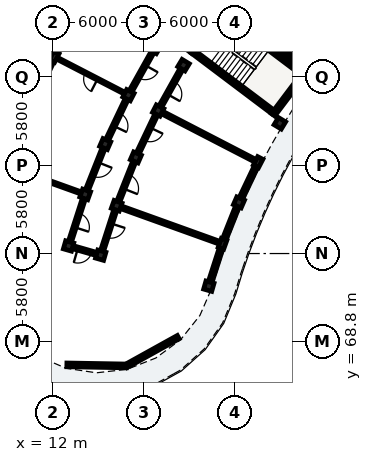
"""IFC4 building model, lengths in metres.
Left out: names, types, materials, properties, quantities, classifications, styles, units other than length and angle.
Written with IfcOpenShell. Run it as: python <this file> out.ifc"""

import sys

from ifc_helpers import new_model, si_unit, direction, frame, frame_2d, origin, origin_2d, place, context, subcontext, project, spatial, rectangle, extrude, element, fill, save


model = new_model("IFC4")
c1 = context("Model", 3, precision=1e-05, world=origin(), true_north=direction((0.0, 1.0)))
c2 = subcontext(c1, "Body", "Model", "MODEL_VIEW")
j1 = project(units=[si_unit("LENGTHUNIT", "METRE"), si_unit("PLANEANGLEUNIT", "RADIAN")], contexts=[c1])
p1 = place(None, origin())
s1 = spatial("IfcSite", under=j1, at=p1, CompositionType="ELEMENT")
p2 = place(p1, origin())
s2 = spatial("IfcBuilding", under=s1, at=p2, CompositionType="ELEMENT")
p3 = place(p2, frame((0.0, 0.0, 15.56)))
s3 = spatial("IfcBuildingStorey", under=s2, at=p3, CompositionType="ELEMENT", Elevation=15.56)
p4 = place(p3, frame((21.199, 87.897, 0.0), z_axis=(0.0, 0.0, 1.0), x_axis=(0.798639633744, -0.601809550782, 0.0)))
e1 = element("IfcWall", 1, at=p4, inside=s3, PredefinedType="SHEAR", context=c2, shape_type="SweptSolid", body=[
    extrude(rectangle(XDim=6.6, YDim=0.28, at=frame_2d((3.3, 0.0))), origin(), (0.0, 0.0, 1.0), 3.11),
])
for number, where, z_axis, x_axis in (
    (2, (26.497, 83.729, 0.0), (0.0, 0.0, 1.0), (0.602, 0.799, 0.0)),
    (3, (21.003, 87.87, 0.0), (0.0, 0.0, 1.0), (0.602, 0.799, 0.0)),
):
    element("IfcWall", number, at=place(p3, frame(where, z_axis=z_axis, x_axis=x_axis)), inside=s3, PredefinedType="SHEAR", context=c2, shape_type="SweptSolid", body=[
        extrude(rectangle(XDim=3.48, YDim=0.28, at=frame_2d((1.74, 0.0))), origin(), (0.0, 0.0, 1.0), 3.11),
    ])
p5 = place(p3, frame((23.125, 90.453, 0.0), z_axis=(0.0, 0.0, 1.0), x_axis=(0.798639633744, -0.601809550782, 0.0)))
e4 = element("IfcWall", 4, at=p5, inside=s3, PredefinedType="SHEAR", context=c2, shape_type="SweptSolid", body=[
    extrude(rectangle(XDim=6.6, YDim=0.28, at=frame_2d((3.3, 0.0))), origin(), (0.0, 0.0, 1.0), 3.11),
])
p6 = place(p5, frame((0.22, 0.0, 0.0)))
e5 = element("IfcOpeningElement", 5, at=p6, cuts=e4, PredefinedType="OPENING", context=c2, shape_type="SweptSolid", body=[
    extrude(rectangle(XDim=1.05, YDim=2.15, at=frame_2d((0.525, 1.075))), frame((0.0, 0.15, 0.0), z_axis=(0.0, -1.0, 0.0), x_axis=(1.0, 0.0, 0.0)), (0.0, 0.0, 1.0), 0.3),
])
p7 = place(p3, frame((26.455, 88.476, 0.0), z_axis=(0.0, 0.0, 1.0), x_axis=(0.798608971494, -0.601850239387, 0.0)))
e6 = element("IfcWall", 6, at=p7, inside=s3, PredefinedType="SHEAR", context=c2, shape_type="SweptSolid", body=[
    extrude(rectangle(XDim=2.7, YDim=0.23, at=frame_2d((1.35, 0.0))), origin(), (0.0, 0.0, 1.0), 3.11),
])
for number, where, z_axis, x_axis in (
    (7, (26.943, 83.167, 0.0), (0.0, 0.0, 1.0), (-0.856, 0.517, 0.0)),
    (8, (20.608, 86.991, 0.0), (0.0, 0.0, 1.0), (-0.856, 0.517, 0.0)),
    (9, (18.724, 88.128, 0.0), (0.0, 0.0, 1.0), (-0.856, 0.517, 0.0)),
):
    element("IfcColumn", number, at=place(p3, frame(where, z_axis=z_axis, x_axis=x_axis)), inside=s3, PredefinedType="COLUMN", context=c2, shape_type="SweptSolid", body=[
        extrude(rectangle(XDim=0.55, YDim=0.55, at=origin_2d()), origin(), (0.0, 0.0, 1.0), 3.11),
    ])
p8 = place(p3, frame((25.513, 80.61, 0.0), z_axis=(0.0, 0.0, 1.0), x_axis=(-0.888350277506, 0.459166401705, 0.0)))
e10 = element("IfcColumn", 10, at=p8, inside=s3, PredefinedType="PILASTER", context=c2, shape_type="SweptSolid", body=[
    extrude(rectangle(XDim=0.38, YDim=0.62, at=origin_2d()), origin(), (0.0, 0.0, 1.0), 3.11),
])
for number, where, z_axis, x_axis in (
    (11, (18.939, 84.008, 0.0), (0.0, 0.0, 1.0), (-0.888, 0.459, 0.0)),
    (12, (16.985, 85.018, 0.0), (0.0, 0.0, 1.0), (-0.888, 0.459, 0.0)),
):
    element("IfcColumn", number, at=place(p3, frame(where, z_axis=z_axis, x_axis=x_axis)), inside=s3, PredefinedType="COLUMN", context=c2, shape_type="SweptSolid", body=[
        extrude(rectangle(XDim=0.55, YDim=0.55, at=origin_2d()), origin(), (0.0, 0.0, 1.0), 3.11),
    ])
p9 = place(p3, frame((12.099, 87.543, 0.0), z_axis=(0.0, 0.0, 1.0), x_axis=(-0.888350277506, 0.459166401705, 0.0)))
e13 = element("IfcColumn", 13, at=p9, inside=s3, PredefinedType="PILASTER", context=c2, shape_type="SweptSolid", body=[
    extrude(rectangle(XDim=0.38, YDim=0.62, at=origin_2d()), origin(), (0.0, 0.0, 1.0), 3.11),
])
for number, where, z_axis, x_axis in (
    (14, (24.254, 77.964, 0.0), (0.0, 0.0, 1.0), (-0.917, 0.4, 0.0)),
    (15, (17.47, 80.921, 0.0), (0.0, 0.0, 1.0), (-0.917, 0.4, 0.0)),
    (16, (15.454, 81.801, 0.0), (0.0, 0.0, 1.0), (-0.917, 0.4, 0.0)),
):
    element("IfcColumn", number, at=place(p3, frame(where, z_axis=z_axis, x_axis=x_axis)), inside=s3, PredefinedType="COLUMN", context=c2, shape_type="SweptSolid", body=[
        extrude(rectangle(XDim=0.55, YDim=0.55, at=origin_2d()), origin(), (0.0, 0.0, 1.0), 3.11),
    ])
p10 = place(p3, frame((23.172, 75.241, 0.0), z_axis=(0.0, 0.0, 1.0), x_axis=(-0.941012100316, 0.338372911236, 0.0)))
e17 = element("IfcColumn", 17, at=p10, inside=s3, PredefinedType="PILASTER", context=c2, shape_type="SweptSolid", body=[
    extrude(rectangle(XDim=0.38, YDim=0.62, at=origin_2d()), origin(), (0.0, 0.0, 1.0), 3.11),
])
for number, where, z_axis, x_axis in (
    (18, (16.208, 77.745, 0.0), (0.0, 0.0, 1.0), (-0.941, 0.338, 0.0)),
    (19, (14.138, 78.489, 0.0), (0.0, 0.0, 1.0), (-0.941, 0.338, 0.0)),
    (20, (22.272, 72.452, 0.0), (0.0, 0.0, 1.0), (-0.961, 0.276, 0.0)),
    (21, (15.159, 74.492, 0.0), (0.0, 0.0, 1.0), (-0.961, 0.276, 0.0)),
    (22, (13.044, 75.098, 0.0), (0.0, 0.0, 1.0), (-0.961, 0.276, 0.0)),
):
    element("IfcColumn", number, at=place(p3, frame(where, z_axis=z_axis, x_axis=x_axis)), inside=s3, PredefinedType="COLUMN", context=c2, shape_type="SweptSolid", body=[
        extrude(rectangle(XDim=0.55, YDim=0.55, at=origin_2d()), origin(), (0.0, 0.0, 1.0), 3.11),
    ])
p11 = place(p3, frame((13.896, 90.756, 0.0), z_axis=(0.0, 0.0, 1.0), x_axis=(-0.488254917997, -0.872701057093, 0.0)))
e23 = element("IfcWall", 23, at=p11, inside=s3, PredefinedType="SOLIDWALL", context=c2, shape_type="SweptSolid", body=[
    extrude(rectangle(XDim=3.521, YDim=0.245, at=frame_2d((1.76, 0.0))), origin(), (0.0, 0.0, 1.0), 2.355),
])
p12 = place(p11, frame((1.271, 0.0, 0.0)))
e24 = element("IfcOpeningElement", 24, at=p12, cuts=e23, PredefinedType="OPENING", context=c2, shape_type="SweptSolid", body=[
    extrude(rectangle(XDim=0.98, YDim=2.12, at=frame_2d((0.49, 1.06))), frame((0.0, 0.133, 0.0), z_axis=(0.0, -1.0, 0.0), x_axis=(1.0, 0.0, 0.0)), (0.0, 0.0, 1.0), 0.265),
])
p13 = place(p3, frame((12.03, 87.399, 0.0), z_axis=(0.0, 0.0, 1.0), x_axis=(-0.429653621352, -0.902993779413, 0.0)))
e25 = element("IfcWall", 25, at=p13, inside=s3, PredefinedType="SOLIDWALL", context=c2, shape_type="SweptSolid", body=[
    extrude(rectangle(XDim=3.521, YDim=0.245, at=frame_2d((1.76, 0.0))), origin(), (0.0, 0.0, 1.0), 2.355),
])
p14 = place(p13, frame((0.86, 0.0, 0.35)))
e26 = element("IfcOpeningElement", 26, at=p14, cuts=e25, PredefinedType="OPENING", context=c2, shape_type="SweptSolid", body=[
    extrude(rectangle(XDim=1.8, YDim=1.85, at=frame_2d((0.9, 0.925))), frame((0.0, 0.133, 0.0), z_axis=(0.0, -1.0, 0.0), x_axis=(1.0, 0.0, 0.0)), (0.0, 0.0, 1.0), 0.265),
])
p15 = place(p3, frame((25.444, 80.466, 0.0), z_axis=(0.0, 0.0, 1.0), x_axis=(-0.429610836066, -0.903014135844, 0.0)))
e27 = element("IfcWall", 27, at=p15, inside=s3, PredefinedType="SOLIDWALL", context=c2, shape_type="SweptSolid", body=[
    extrude(rectangle(XDim=2.525, YDim=0.245, at=frame_2d((1.263, 0.0))), origin(), (0.0, 0.0, 1.0), 2.355),
])
p16 = place(p15, frame((0.683, 0.0, 0.55)))
e28 = element("IfcOpeningElement", 28, at=p16, cuts=e27, PredefinedType="OPENING", context=c2, shape_type="SweptSolid", body=[
    extrude(rectangle(XDim=1.16, YDim=1.485, at=frame_2d((0.58, 0.743))), frame((0.0, 0.133, 0.0), z_axis=(0.0, -1.0, 0.0), x_axis=(1.0, 0.0, 0.0)), (0.0, 0.0, 1.0), 0.265),
])
p17 = place(p3, frame((24.163, 77.736, 0.0), z_axis=(0.0, 0.0, 1.0), x_axis=(-0.369122600107, -0.92938071106, 0.0)))
e29 = element("IfcWall", 29, at=p17, inside=s3, PredefinedType="SOLIDWALL", context=c2, shape_type="SweptSolid", body=[
    extrude(rectangle(XDim=2.525, YDim=0.245, at=frame_2d((1.263, 0.0))), origin(), (0.0, 0.0, 1.0), 2.355),
])
p18 = place(p17, frame((0.623, 0.0, 0.55)))
e30 = element("IfcOpeningElement", 30, at=p18, cuts=e29, PredefinedType="OPENING", context=c2, shape_type="SweptSolid", body=[
    extrude(rectangle(XDim=1.28, YDim=1.56, at=frame_2d((0.64, 0.78))), frame((0.0, 0.133, 0.0), z_axis=(0.0, -1.0, 0.0), x_axis=(1.0, 0.0, 0.0)), (0.0, 0.0, 1.0), 0.265),
])
p19 = place(p3, frame((23.123, 75.088, 0.0), z_axis=(0.0, 0.0, 1.0), x_axis=(-0.30716379336, -0.951656662903, 0.0)))
e31 = element("IfcWall", 31, at=p19, inside=s3, PredefinedType="SOLIDWALL", context=c2, shape_type="SweptSolid", body=[
    extrude(rectangle(XDim=2.525, YDim=0.245, at=frame_2d((1.263, 0.0))), origin(), (0.0, 0.0, 1.0), 2.355),
])
p20 = place(p19, frame((0.562, 0.0, 0.35)))
e32 = element("IfcOpeningElement", 32, at=p20, cuts=e31, PredefinedType="OPENING", context=c2, shape_type="SweptSolid", body=[
    extrude(rectangle(XDim=1.4, YDim=1.635, at=frame_2d((0.7, 0.817))), frame((0.0, 0.133, 0.0), z_axis=(0.0, -1.0, 0.0), x_axis=(1.0, 0.0, 0.0)), (0.0, 0.0, 1.0), 0.265),
])
p21 = place(p3, frame((20.259, 69.102, 0.0), z_axis=(0.0, 0.0, 1.0), x_axis=(-0.874643043537, -0.484767517881, 0.0)))
e33 = element("IfcWall", 33, at=p21, inside=s3, PredefinedType="SOLIDWALL", context=c2, shape_type="SweptSolid", body=[
    extrude(rectangle(XDim=3.908, YDim=0.245, at=frame_2d((1.954, 0.0))), origin(), (0.0, 0.0, 1.0), 2.355),
])
p22 = place(p21, frame((0.979, 0.0, 0.4)))
e34 = element("IfcOpeningElement", 34, at=p22, cuts=e33, PredefinedType="OPENING", context=c2, shape_type="SweptSolid", body=[
    extrude(rectangle(XDim=1.95, YDim=1.78, at=frame_2d((0.975, 0.89))), frame((0.0, 0.133, 0.0), z_axis=(0.0, -1.0, 0.0), x_axis=(1.0, 0.0, 0.0)), (0.0, 0.0, 1.0), 0.265),
])
p23 = place(p3, frame((16.841, 67.208, 0.0), z_axis=(0.0, 0.0, 1.0), x_axis=(-0.999848096392, 0.017429404492, 0.0)))
e35 = element("IfcWall", 35, at=p23, inside=s3, PredefinedType="SOLIDWALL", context=c2, shape_type="SweptSolid", body=[
    extrude(rectangle(XDim=3.908, YDim=0.245, at=frame_2d((1.954, 0.0))), origin(), (0.0, 0.0, 1.0), 2.355),
])
p24 = place(p3, frame((18.553, 87.822, 0.0), z_axis=(0.0, 0.0, 1.0), x_axis=(-0.488211211273, -0.872725508501, 0.0)))
e36 = element("IfcWall", 36, at=p24, inside=s3, PredefinedType="PARTITIONING", context=c2, shape_type="SweptSolid", body=[
    extrude(rectangle(XDim=2.863, YDim=0.205, at=frame_2d((1.431, 0.0))), origin(), (0.0, 0.0, 1.0), 2.37),
])
p25 = place(p24, frame((0.957, 0.0, 0.0)))
e37 = element("IfcOpeningElement", 37, at=p25, cuts=e36, PredefinedType="OPENING", context=c2, shape_type="SweptSolid", body=[
    extrude(rectangle(XDim=0.95, YDim=2.13, at=frame_2d((0.475, 1.065))), frame((0.0, 0.113, 0.0), z_axis=(0.0, -1.0, 0.0), x_axis=(1.0, 0.0, 0.0)), (0.0, 0.0, 1.0), 0.225),
])
p26 = place(p3, frame((20.437, 86.685, 0.0), z_axis=(0.0, 0.0, 1.0), x_axis=(-0.48819576874, -0.872734147025, 0.0)))
e38 = element("IfcWall", 38, at=p26, inside=s3, PredefinedType="PARTITIONING", context=c2, shape_type="SweptSolid", body=[
    extrude(rectangle(XDim=2.718, YDim=0.205, at=frame_2d((1.359, 0.0))), origin(), (0.0, 0.0, 1.0), 2.37),
])
p27 = place(p26, frame((0.884, 0.0, 0.0)))
e39 = element("IfcOpeningElement", 39, at=p27, cuts=e38, PredefinedType="OPENING", context=c2, shape_type="SweptSolid", body=[
    extrude(rectangle(XDim=0.95, YDim=2.13, at=frame_2d((0.475, 1.065))), frame((0.0, 0.113, 0.0), z_axis=(0.0, -1.0, 0.0), x_axis=(1.0, 0.0, 0.0)), (0.0, 0.0, 1.0), 0.225),
])
p28 = place(p3, frame((16.629, 85.202, 0.0), z_axis=(0.0, 0.0, 1.0), x_axis=(-0.88836305433, 0.459141681512, 0.0)))
e40 = element("IfcWall", 40, at=p28, inside=s3, PredefinedType="PARTITIONING", context=c2, shape_type="SweptSolid", body=[
    extrude(rectangle(XDim=4.7, YDim=0.125, at=frame_2d((2.35, 0.0))), origin(), (0.0, 0.0, 1.0), 2.37),
])
p29 = place(p28, frame((1.895, 0.0, 0.0)))
e41 = element("IfcOpeningElement", 41, at=p29, cuts=e40, PredefinedType="OPENING", context=c2, shape_type="SweptSolid", body=[
    extrude(rectangle(XDim=0.91, YDim=2.1, at=frame_2d((0.455, 1.05))), frame((0.0, 0.073, 0.0), z_axis=(0.0, -1.0, 0.0), x_axis=(1.0, 0.0, 0.0)), (0.0, 0.0, 1.0), 0.145),
])
p30 = place(p3, frame((25.157, 80.794, 0.0), z_axis=(0.0, 0.0, 1.0), x_axis=(-0.888346696024, 0.459173330741, 0.0)))
e42 = element("IfcWall", 42, at=p30, inside=s3, PredefinedType="PARTITIONING", context=c2, shape_type="SweptSolid", body=[
    extrude(rectangle(XDim=6.6, YDim=0.185, at=frame_2d((3.3, 0.0))), origin(), (0.0, 0.0, 1.0), 2.37),
])
p31 = place(p3, frame((16.834, 84.702, 0.0), z_axis=(0.0, 0.0, 1.0), x_axis=(-0.429595933416, -0.90302122566, 0.0)))
e43 = element("IfcWall", 43, at=p31, inside=s3, PredefinedType="PARTITIONING", context=c2, shape_type="SweptSolid", body=[
    extrude(rectangle(XDim=2.863, YDim=0.205, at=frame_2d((1.432, 0.0))), origin(), (0.0, 0.0, 1.0), 2.37),
])
p32 = place(p31, frame((0.967, 0.0, 0.0)))
e44 = element("IfcOpeningElement", 44, at=p32, cuts=e43, PredefinedType="OPENING", context=c2, shape_type="SweptSolid", body=[
    extrude(rectangle(XDim=0.93, YDim=2.12, at=frame_2d((0.465, 1.06))), frame((0.0, 0.113, 0.0), z_axis=(0.0, -1.0, 0.0), x_axis=(1.0, 0.0, 0.0)), (0.0, 0.0, 1.0), 0.225),
])
p33 = place(p3, frame((18.789, 83.692, 0.0), z_axis=(0.0, 0.0, 1.0), x_axis=(-0.429630211913, -0.90300491749, 0.0)))
e45 = element("IfcWall", 45, at=p33, inside=s3, PredefinedType="PARTITIONING", context=c2, shape_type="SweptSolid", body=[
    extrude(rectangle(XDim=2.718, YDim=0.205, at=frame_2d((1.359, 0.0))), origin(), (0.0, 0.0, 1.0), 2.37),
])
p34 = place(p33, frame((0.894, 0.0, 0.0)))
e46 = element("IfcOpeningElement", 46, at=p34, cuts=e45, PredefinedType="OPENING", context=c2, shape_type="SweptSolid", body=[
    extrude(rectangle(XDim=0.93, YDim=2.12, at=frame_2d((0.465, 1.06))), frame((0.0, 0.113, 0.0), z_axis=(0.0, -1.0, 0.0), x_axis=(1.0, 0.0, 0.0)), (0.0, 0.0, 1.0), 0.225),
])
p35 = place(p3, frame((15.325, 81.475, 0.0), z_axis=(0.0, 0.0, 1.0), x_axis=(-0.369213832442, -0.929344471083, 0.0)))
e47 = element("IfcWall", 47, at=p35, inside=s3, PredefinedType="PARTITIONING", context=c2, shape_type="SweptSolid", body=[
    extrude(rectangle(XDim=2.863, YDim=0.205, at=frame_2d((1.432, 0.0))), origin(), (0.0, 0.0, 1.0), 2.37),
])
p36 = place(p35, frame((0.937, 0.0, 0.0)))
e48 = element("IfcOpeningElement", 48, at=p36, cuts=e47, PredefinedType="OPENING", context=c2, shape_type="SweptSolid", body=[
    extrude(rectangle(XDim=0.99, YDim=2.16, at=frame_2d((0.495, 1.08))), frame((0.0, 0.113, 0.0), z_axis=(0.0, -1.0, 0.0), x_axis=(1.0, 0.0, 0.0)), (0.0, 0.0, 1.0), 0.225),
])
p37 = place(p3, frame((17.341, 80.596, 0.0), z_axis=(0.0, 0.0, 1.0), x_axis=(-0.369237170461, -0.929335198919, 0.0)))
e49 = element("IfcWall", 49, at=p37, inside=s3, PredefinedType="PARTITIONING", context=c2, shape_type="SweptSolid", body=[
    extrude(rectangle(XDim=2.718, YDim=0.205, at=frame_2d((1.359, 0.0))), origin(), (0.0, 0.0, 1.0), 2.37),
])
p38 = place(p37, frame((0.864, 0.0, 0.0)))
e50 = element("IfcOpeningElement", 50, at=p38, cuts=e49, PredefinedType="OPENING", context=c2, shape_type="SweptSolid", body=[
    extrude(rectangle(XDim=0.99, YDim=2.16, at=frame_2d((0.495, 1.08))), frame((0.0, 0.113, 0.0), z_axis=(0.0, -1.0, 0.0), x_axis=(1.0, 0.0, 0.0)), (0.0, 0.0, 1.0), 0.225),
])
p39 = place(p3, frame((13.762, 78.625, 0.0), z_axis=(0.0, 0.0, 1.0), x_axis=(-0.941015806044, 0.338362605463, 0.0)))
e51 = element("IfcWall", 51, at=p39, inside=s3, PredefinedType="PLUMBINGWALL", context=c2, shape_type="SweptSolid", body=[
    extrude(rectangle(XDim=4.7, YDim=0.14, at=frame_2d((2.35, 0.0))), origin(), (0.0, 0.0, 1.0), 2.37),
])
p40 = place(p39, frame((1.92, 0.0, 0.0)))
e52 = element("IfcOpeningElement", 52, at=p40, cuts=e51, PredefinedType="OPENING", context=c2, shape_type="SweptSolid", body=[
    extrude(rectangle(XDim=0.86, YDim=2.06, at=frame_2d((0.43, 1.03))), frame((0.0, 0.08, 0.0), z_axis=(0.0, -1.0, 0.0), x_axis=(1.0, 0.0, 0.0)), (0.0, 0.0, 1.0), 0.16),
])
p41 = place(p3, frame((22.796, 75.376, 0.0), z_axis=(0.0, 0.0, 1.0), x_axis=(-0.941005714099, 0.338390670725, 0.0)))
e53 = element("IfcWall", 53, at=p41, inside=s3, PredefinedType="PARTITIONING", context=c2, shape_type="SweptSolid", body=[
    extrude(rectangle(XDim=6.6, YDim=0.185, at=frame_2d((3.3, 0.0))), origin(), (0.0, 0.0, 1.0), 2.37),
])
p42 = place(p3, frame((14.031, 78.156, 0.0), z_axis=(0.0, 0.0, 1.0), x_axis=(-0.307132325305, -0.951666819193, 0.0)))
e54 = element("IfcWall", 54, at=p42, inside=s3, PredefinedType="PARTITIONING", context=c2, shape_type="SweptSolid", body=[
    extrude(rectangle(XDim=2.863, YDim=0.205, at=frame_2d((1.432, 0.0))), origin(), (0.0, 0.0, 1.0), 2.37),
])
p43 = place(p42, frame((0.947, 0.0, 0.0)))
e55 = element("IfcOpeningElement", 55, at=p43, cuts=e54, PredefinedType="OPENING", context=c2, shape_type="SweptSolid", body=[
    extrude(rectangle(XDim=0.97, YDim=2.15, at=frame_2d((0.485, 1.075))), frame((0.0, 0.113, 0.0), z_axis=(0.0, -1.0, 0.0), x_axis=(1.0, 0.0, 0.0)), (0.0, 0.0, 1.0), 0.225),
])
p44 = place(p3, frame((16.101, 77.412, 0.0), z_axis=(0.0, 0.0, 1.0), x_axis=(-0.307186478934, -0.95164934044, 0.0)))
e56 = element("IfcWall", 56, at=p44, inside=s3, PredefinedType="PARTITIONING", context=c2, shape_type="SweptSolid", body=[
    extrude(rectangle(XDim=2.718, YDim=0.205, at=frame_2d((1.359, 0.0))), origin(), (0.0, 0.0, 1.0), 2.37),
])
p45 = place(p44, frame((0.874, 0.0, 0.0)))
e57 = element("IfcOpeningElement", 57, at=p45, cuts=e56, PredefinedType="OPENING", context=c2, shape_type="SweptSolid", body=[
    extrude(rectangle(XDim=0.97, YDim=2.15, at=frame_2d((0.485, 1.075))), frame((0.0, 0.113, 0.0), z_axis=(0.0, -1.0, 0.0), x_axis=(1.0, 0.0, 0.0)), (0.0, 0.0, 1.0), 0.225),
])
p46 = place(p3, frame((15.111, 74.506, 0.0), z_axis=(0.0, 0.0, 1.0), x_axis=(-0.961264701934, 0.275626872449, 0.0)))
e58 = element("IfcWall", 58, at=p46, inside=s3, PredefinedType="PARTITIONING", context=c2, shape_type="SweptSolid", body=[
    extrude(rectangle(XDim=2.1, YDim=0.205, at=frame_2d((1.05, 0.0))), origin(), (0.0, 0.0, 1.0), 2.37),
])
p47 = place(p46, frame((0.57, 0.0, 0.0)))
e59 = element("IfcOpeningElement", 59, at=p47, cuts=e58, PredefinedType="OPENING", context=c2, shape_type="SweptSolid", body=[
    extrude(rectangle(XDim=0.95, YDim=2.13, at=frame_2d((0.475, 1.065))), frame((0.0, 0.113, 0.0), z_axis=(0.0, -1.0, 0.0), x_axis=(1.0, 0.0, 0.0)), (0.0, 0.0, 1.0), 0.225),
])
p48 = place(p16, origin())
e60 = element("IfcWindow", 60, at=p48, inside=s3, PartitioningType="SINGLE_PANEL", PredefinedType="WINDOW", context=c2, shape_type="SweptSolid", body=[
    extrude(rectangle(XDim=1.16, YDim=1.485, at=frame_2d((0.58, 0.743))), frame((0.0, 0.03, 0.0), z_axis=(0.0, -1.0, 0.0), x_axis=(1.0, 0.0, 0.0)), (0.0, 0.0, 1.0), 0.06),
])
fill(e28, e60)
p49 = place(p18, origin())
e61 = element("IfcWindow", 61, at=p49, inside=s3, PartitioningType="SINGLE_PANEL", PredefinedType="WINDOW", context=c2, shape_type="SweptSolid", body=[
    extrude(rectangle(XDim=1.28, YDim=1.56, at=frame_2d((0.64, 0.78))), frame((0.0, 0.03, 0.0), z_axis=(0.0, -1.0, 0.0), x_axis=(1.0, 0.0, 0.0)), (0.0, 0.0, 1.0), 0.06),
])
fill(e30, e61)
p50 = place(p20, origin())
e62 = element("IfcWindow", 62, at=p50, inside=s3, PartitioningType="SINGLE_PANEL", PredefinedType="WINDOW", context=c2, shape_type="SweptSolid", body=[
    extrude(rectangle(XDim=1.4, YDim=1.635, at=frame_2d((0.7, 0.817))), frame((0.0, 0.03, 0.0), z_axis=(0.0, -1.0, 0.0), x_axis=(1.0, 0.0, 0.0)), (0.0, 0.0, 1.0), 0.06),
])
fill(e32, e62)
p51 = place(p22, origin())
e63 = element("IfcWindow", 63, at=p51, inside=s3, PartitioningType="SINGLE_PANEL", PredefinedType="WINDOW", context=c2, shape_type="SweptSolid", body=[
    extrude(rectangle(XDim=1.95, YDim=1.78, at=frame_2d((0.975, 0.89))), frame((0.0, 0.03, 0.0), z_axis=(0.0, -1.0, 0.0), x_axis=(1.0, 0.0, 0.0)), (0.0, 0.0, 1.0), 0.06),
])
fill(e34, e63)
p52 = place(p25, origin())
e64 = element("IfcDoor", 64, at=p52, inside=s3, OperationType="SINGLE_SWING_LEFT", PredefinedType="DOOR", context=c2, shape_type="SweptSolid", body=[
    extrude(rectangle(XDim=0.95, YDim=2.13, at=frame_2d((0.475, 1.065))), frame((0.0, 0.025, 0.0), z_axis=(0.0, -1.0, 0.0), x_axis=(1.0, 0.0, 0.0)), (0.0, 0.0, 1.0), 0.05),
])
fill(e37, e64)
p53 = place(p27, origin())
e65 = element("IfcDoor", 65, at=p53, inside=s3, OperationType="SINGLE_SWING_RIGHT", PredefinedType="DOOR", context=c2, shape_type="SweptSolid", body=[
    extrude(rectangle(XDim=0.95, YDim=2.13, at=frame_2d((0.475, 1.065))), frame((0.0, 0.025, 0.0), z_axis=(0.0, -1.0, 0.0), x_axis=(1.0, 0.0, 0.0)), (0.0, 0.0, 1.0), 0.05),
])
fill(e39, e65)
p54 = place(p29, origin())
e66 = element("IfcDoor", 66, at=p54, inside=s3, OperationType="SINGLE_SWING_LEFT", PredefinedType="DOOR", context=c2, shape_type="SweptSolid", body=[
    extrude(rectangle(XDim=0.91, YDim=2.1, at=frame_2d((0.455, 1.05))), frame((0.0, 0.025, 0.0), z_axis=(0.0, -1.0, 0.0), x_axis=(1.0, 0.0, 0.0)), (0.0, 0.0, 1.0), 0.05),
])
fill(e41, e66)
p55 = place(p32, origin())
e67 = element("IfcDoor", 67, at=p55, inside=s3, OperationType="SINGLE_SWING_RIGHT", PredefinedType="DOOR", context=c2, shape_type="SweptSolid", body=[
    extrude(rectangle(XDim=0.93, YDim=2.12, at=frame_2d((0.465, 1.06))), frame((0.0, 0.025, 0.0), z_axis=(0.0, -1.0, 0.0), x_axis=(1.0, 0.0, 0.0)), (0.0, 0.0, 1.0), 0.05),
])
fill(e44, e67)
p56 = place(p34, origin())
e68 = element("IfcDoor", 68, at=p56, inside=s3, OperationType="SINGLE_SWING_LEFT", PredefinedType="DOOR", context=c2, shape_type="SweptSolid", body=[
    extrude(rectangle(XDim=0.93, YDim=2.12, at=frame_2d((0.465, 1.06))), frame((0.0, 0.025, 0.0), z_axis=(0.0, -1.0, 0.0), x_axis=(1.0, 0.0, 0.0)), (0.0, 0.0, 1.0), 0.05),
])
fill(e46, e68)
p57 = place(p36, origin())
e69 = element("IfcDoor", 69, at=p57, inside=s3, OperationType="SINGLE_SWING_LEFT", PredefinedType="DOOR", context=c2, shape_type="SweptSolid", body=[
    extrude(rectangle(XDim=0.99, YDim=2.16, at=frame_2d((0.495, 1.08))), frame((0.0, 0.025, 0.0), z_axis=(0.0, -1.0, 0.0), x_axis=(1.0, 0.0, 0.0)), (0.0, 0.0, 1.0), 0.05),
])
fill(e48, e69)
p58 = place(p38, origin())
e70 = element("IfcDoor", 70, at=p58, inside=s3, OperationType="SINGLE_SWING_RIGHT", PredefinedType="DOOR", context=c2, shape_type="SweptSolid", body=[
    extrude(rectangle(XDim=0.99, YDim=2.16, at=frame_2d((0.495, 1.08))), frame((0.0, 0.025, 0.0), z_axis=(0.0, -1.0, 0.0), x_axis=(1.0, 0.0, 0.0)), (0.0, 0.0, 1.0), 0.05),
])
fill(e50, e70)
p59 = place(p40, origin())
e71 = element("IfcDoor", 71, at=p59, inside=s3, OperationType="SINGLE_SWING_LEFT", PredefinedType="DOOR", context=c2, shape_type="SweptSolid", body=[
    extrude(rectangle(XDim=0.86, YDim=2.06, at=frame_2d((0.43, 1.03))), frame((0.0, 0.025, 0.0), z_axis=(0.0, -1.0, 0.0), x_axis=(1.0, 0.0, 0.0)), (0.0, 0.0, 1.0), 0.05),
])
fill(e52, e71)
p60 = place(p43, origin())
e72 = element("IfcDoor", 72, at=p60, inside=s3, OperationType="SINGLE_SWING_RIGHT", PredefinedType="DOOR", context=c2, shape_type="SweptSolid", body=[
    extrude(rectangle(XDim=0.97, YDim=2.15, at=frame_2d((0.485, 1.075))), frame((0.0, 0.025, 0.0), z_axis=(0.0, -1.0, 0.0), x_axis=(1.0, 0.0, 0.0)), (0.0, 0.0, 1.0), 0.05),
])
fill(e55, e72)
p61 = place(p45, origin())
e73 = element("IfcDoor", 73, at=p61, inside=s3, OperationType="SINGLE_SWING_LEFT", PredefinedType="DOOR", context=c2, shape_type="SweptSolid", body=[
    extrude(rectangle(XDim=0.97, YDim=2.15, at=frame_2d((0.485, 1.075))), frame((0.0, 0.025, 0.0), z_axis=(0.0, -1.0, 0.0), x_axis=(1.0, 0.0, 0.0)), (0.0, 0.0, 1.0), 0.05),
])
fill(e57, e73)
p62 = place(p47, origin())
e74 = element("IfcDoor", 74, at=p62, inside=s3, OperationType="SINGLE_SWING_RIGHT", PredefinedType="DOOR", context=c2, shape_type="SweptSolid", body=[
    extrude(rectangle(XDim=0.95, YDim=2.13, at=frame_2d((0.475, 1.065))), frame((0.0, 0.025, 0.0), z_axis=(0.0, -1.0, 0.0), x_axis=(1.0, 0.0, 0.0)), (0.0, 0.0, 1.0), 0.05),
])
fill(e59, e74)
save(model, sys.argv[1])
